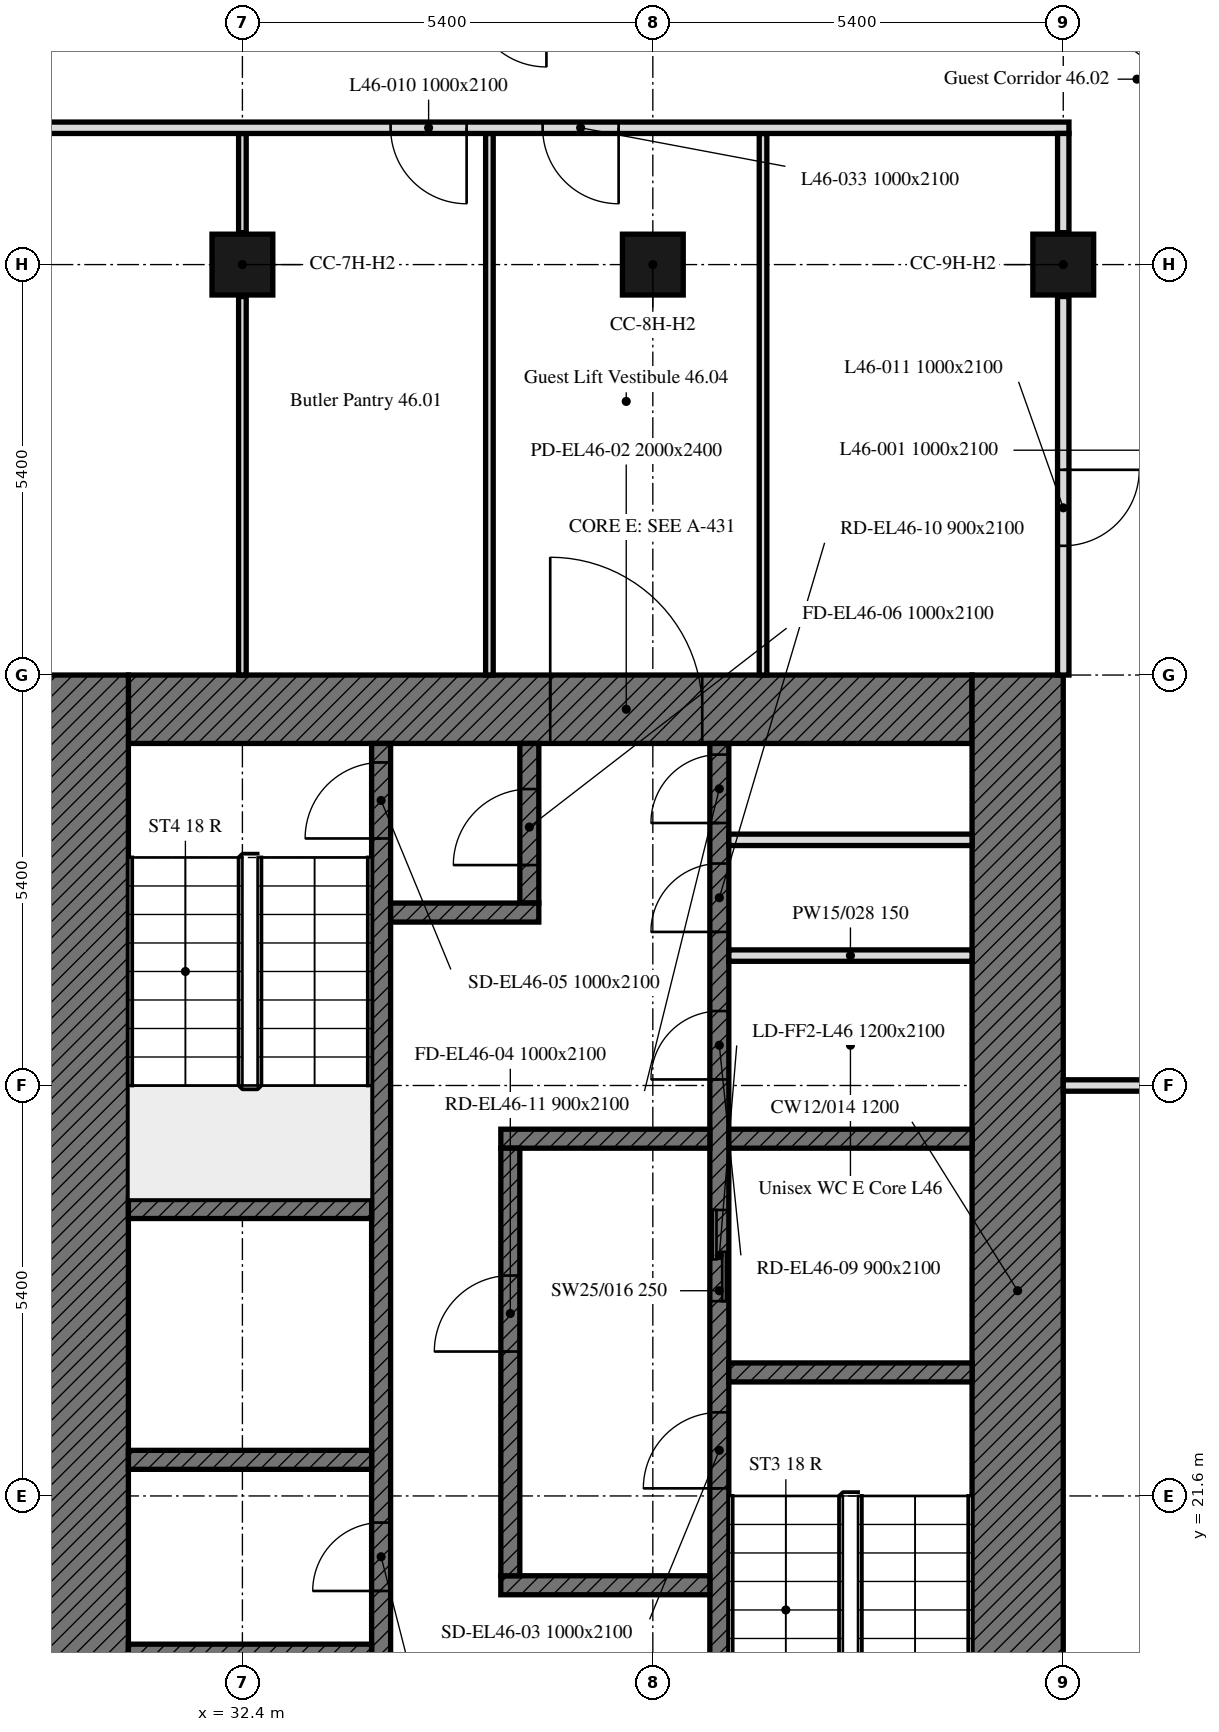
"""IFC4 building model, lengths in metres.
Left out: names, types, materials, properties, quantities, classifications, styles, units other than length and angle.
Written with IfcOpenShell. Run it as: python <this file> out.ifc"""

import sys

from ifc_helpers import new_model, si_unit, direction, frame, frame_2d, origin, origin_2d, place, context, subcontext, project, spatial, rectangle, extrude, element, fill, save


model = new_model("IFC4")
c1 = context("Model", 3, precision=1e-05, world=origin(), true_north=direction((0.0, 1.0)))
c2 = subcontext(c1, "Body", "Model", "MODEL_VIEW")
j1 = project(units=[si_unit("LENGTHUNIT", "METRE"), si_unit("PLANEANGLEUNIT", "RADIAN")], contexts=[c1])
p1 = place(None, origin())
s1 = spatial("IfcSite", under=j1, at=p1, CompositionType="ELEMENT")
p2 = place(p1, origin())
s2 = spatial("IfcBuilding", under=s1, at=p2, CompositionType="ELEMENT")
p3 = place(p2, frame((0.0, 0.0, 190.6)))
s3 = spatial("IfcBuildingStorey", under=s2, at=p3, CompositionType="ELEMENT", Elevation=190.6)
for number, where, z_axis, x_axis in (
    (1, (32.4, 37.8, 0.0), (0.0, 0.0, 1.0), (1.0, 0.0, 0.0)),
    (2, (37.8, 37.8, 0.0), (0.0, 0.0, 1.0), (1.0, 0.0, 0.0)),
    (3, (43.2, 37.8, 0.0), (0.0, 0.0, 1.0), (1.0, 0.0, 0.0)),
):
    element("IfcColumn", number, at=place(p3, frame(where, z_axis=z_axis, x_axis=x_axis)), inside=s3, PredefinedType="COLUMN", context=c2, shape_type="SweptSolid", body=[
        extrude(rectangle(XDim=0.8, YDim=0.8, at=origin_2d()), origin(), (0.0, 0.0, 1.0), 3.0),
    ])
p4 = place(p3, frame((30.9, 31.95, 0.0), z_axis=(0.0, 0.0, 1.0), x_axis=(1.0, 0.0, 0.0)))
e4 = element("IfcWall", 4, at=p4, inside=s3, PredefinedType="SOLIDWALL", context=c2, shape_type="SweptSolid", body=[
    extrude(rectangle(XDim=11.1, YDim=0.9, at=frame_2d((5.55, 0.0))), origin(), (0.0, 0.0, 1.0), 3.0),
])
p5 = place(p4, frame((5.55, 0.0, 0.0)))
e5 = element("IfcOpeningElement", 5, at=p5, cuts=e4, PredefinedType="OPENING", context=c2, shape_type="SweptSolid", body=[
    extrude(rectangle(XDim=2.0, YDim=2.4, at=frame_2d((1.0, 1.2))), frame((0.0, 0.45, 0.0), z_axis=(0.0, -1.0, 0.0), x_axis=(1.0, 0.0, 0.0)), (0.0, 0.0, 1.0), 0.9),
])
for number, where, z_axis, x_axis in (
    (6, (42.6, 32.4, 0.0), (0.0, 0.0, 1.0), (0.0, -1.0, 0.0)),
    (7, (30.3, 16.2, 0.0), (0.0, 0.0, 1.0), (0.0, 1.0, 0.0)),
):
    element("IfcWall", number, at=place(p3, frame(where, z_axis=z_axis, x_axis=x_axis)), inside=s3, PredefinedType="SOLIDWALL", context=c2, shape_type="SweptSolid", body=[
        extrude(rectangle(XDim=16.2, YDim=1.2, at=frame_2d((8.1, 0.0))), origin(), (0.0, 0.0, 1.0), 3.0),
    ])
p6 = place(p3, frame((38.675, 17.1, 0.0), z_axis=(0.0, 0.0, 1.0), x_axis=(0.0, 1.0, 0.0)))
e8 = element("IfcWall", 8, at=p6, inside=s3, PredefinedType="SOLIDWALL", context=c2, shape_type="SweptSolid", body=[
    extrude(rectangle(XDim=14.4, YDim=0.25, at=frame_2d((7.2, 0.0))), origin(), (0.0, 0.0, 1.0), 3.0),
])
p7 = place(p6, frame((4.6, 0.0, 0.0)))
e9 = element("IfcOpeningElement", 9, at=p7, cuts=e8, PredefinedType="OPENING", context=c2, shape_type="SweptSolid", body=[
    extrude(rectangle(XDim=1.0, YDim=2.1, at=frame_2d((0.5, 1.05))), frame((0.0, 0.125, 0.0), z_axis=(0.0, -1.0, 0.0), x_axis=(1.0, 0.0, 0.0)), (0.0, 0.0, 1.0), 0.25),
])
p8 = place(p6, frame((7.062, 0.0, 0.0)))
e10 = element("IfcOpeningElement", 10, at=p8, cuts=e8, PredefinedType="OPENING", context=c2, shape_type="SweptSolid", body=[
    extrude(rectangle(XDim=1.2, YDim=2.1, at=frame_2d((0.6, 1.05))), frame((0.0, 0.125, 0.0), z_axis=(0.0, -1.0, 0.0), x_axis=(1.0, 0.0, 0.0)), (0.0, 0.0, 1.0), 0.25),
])
p9 = place(p6, frame((9.979, 0.0, 0.0)))
e11 = element("IfcOpeningElement", 11, at=p9, cuts=e8, PredefinedType="OPENING", context=c2, shape_type="SweptSolid", body=[
    extrude(rectangle(XDim=0.9, YDim=2.1, at=frame_2d((0.45, 1.05))), frame((0.0, 0.125, 0.0), z_axis=(0.0, -1.0, 0.0), x_axis=(1.0, 0.0, 0.0)), (0.0, 0.0, 1.0), 0.25),
])
p10 = place(p6, frame((11.92, 0.0, 0.0)))
e12 = element("IfcOpeningElement", 12, at=p10, cuts=e8, PredefinedType="OPENING", context=c2, shape_type="SweptSolid", body=[
    extrude(rectangle(XDim=0.9, YDim=2.1, at=frame_2d((0.45, 1.05))), frame((0.0, 0.125, 0.0), z_axis=(0.0, -1.0, 0.0), x_axis=(1.0, 0.0, 0.0)), (0.0, 0.0, 1.0), 0.25),
])
p11 = place(p6, frame((13.354, 0.0, 0.0)))
e13 = element("IfcOpeningElement", 13, at=p11, cuts=e8, PredefinedType="OPENING", context=c2, shape_type="SweptSolid", body=[
    extrude(rectangle(XDim=0.9, YDim=2.1, at=frame_2d((0.45, 1.05))), frame((0.0, 0.125, 0.0), z_axis=(0.0, -1.0, 0.0), x_axis=(1.0, 0.0, 0.0)), (0.0, 0.0, 1.0), 0.25),
])
p12 = place(p3, frame((34.225, 17.1, 0.0), z_axis=(0.0, 0.0, 1.0), x_axis=(0.0, 1.0, 0.0)))
e14 = element("IfcWall", 14, at=p12, inside=s3, PredefinedType="SOLIDWALL", context=c2, shape_type="SweptSolid", body=[
    extrude(rectangle(XDim=14.4, YDim=0.25, at=frame_2d((7.2, 0.0))), origin(), (0.0, 0.0, 1.0), 3.0),
])
p13 = place(p12, frame((13.15, 0.0, 0.0)))
e15 = element("IfcOpeningElement", 15, at=p13, cuts=e14, PredefinedType="OPENING", context=c2, shape_type="SweptSolid", body=[
    extrude(rectangle(XDim=1.0, YDim=2.1, at=frame_2d((0.5, 1.05))), frame((0.0, 0.125, 0.0), z_axis=(0.0, -1.0, 0.0), x_axis=(1.0, 0.0, 0.0)), (0.0, 0.0, 1.0), 0.25),
])
p14 = place(p12, frame((0.6, 0.0, 0.0)))
e16 = element("IfcOpeningElement", 16, at=p14, cuts=e14, PredefinedType="OPENING", context=c2, shape_type="SweptSolid", body=[
    extrude(rectangle(XDim=1.1, YDim=2.1, at=frame_2d((0.55, 1.05))), frame((0.0, 0.125, 0.0), z_axis=(0.0, -1.0, 0.0), x_axis=(1.0, 0.0, 0.0)), (0.0, 0.0, 1.0), 0.25),
])
p15 = place(p12, frame((3.25, 0.0, 0.0)))
e17 = element("IfcOpeningElement", 17, at=p15, cuts=e14, PredefinedType="OPENING", context=c2, shape_type="SweptSolid", body=[
    extrude(rectangle(XDim=0.9, YDim=2.1, at=frame_2d((0.45, 1.05))), frame((0.0, 0.125, 0.0), z_axis=(0.0, -1.0, 0.0), x_axis=(1.0, 0.0, 0.0)), (0.0, 0.0, 1.0), 0.25),
])
p16 = place(p3, frame((38.8, 23.225, 0.0), z_axis=(0.0, 0.0, 1.0), x_axis=(1.0, 0.0, 0.0)))
e18 = element("IfcWall", 18, at=p16, inside=s3, PredefinedType="SOLIDWALL", context=c2, shape_type="SweptSolid", body=[
    extrude(rectangle(XDim=3.2, YDim=0.25, at=frame_2d((1.6, 0.0))), origin(), (0.0, 0.0, 1.0), 3.0),
])
for number, where, z_axis, x_axis in (
    (19, (30.9, 25.375, 0.0), (0.0, 0.0, 1.0), (1.0, 0.0, 0.0)),
    (20, (30.9, 22.075, 0.0), (0.0, 0.0, 1.0), (1.0, 0.0, 0.0)),
):
    element("IfcWall", number, at=place(p3, frame(where, z_axis=z_axis, x_axis=x_axis)), inside=s3, PredefinedType="SOLIDWALL", context=c2, shape_type="SweptSolid", body=[
        extrude(rectangle(XDim=3.2, YDim=0.25, at=frame_2d((1.6, 0.0))), origin(), (0.0, 0.0, 1.0), 3.0),
    ])
p17 = place(p3, frame((38.8, 26.3, 0.0), z_axis=(0.0, 0.0, 1.0), x_axis=(1.0, 0.0, 0.0)))
e21 = element("IfcWall", 21, at=p17, inside=s3, PredefinedType="SOLIDWALL", context=c2, shape_type="SweptSolid", body=[
    extrude(rectangle(XDim=3.2, YDim=0.25, at=frame_2d((1.6, 0.0))), origin(), (0.0, 0.0, 1.0), 3.0),
])
for number, where, z_axis, x_axis in (
    (22, (35.8, 26.3, 0.0), (0.0, 0.0, 1.0), (1.0, 0.0, 0.0)),
    (23, (35.8, 20.425, 0.0), (0.0, 0.0, 1.0), (1.0, 0.0, 0.0)),
):
    element("IfcWall", number, at=place(p3, frame(where, z_axis=z_axis, x_axis=x_axis)), inside=s3, PredefinedType="SOLIDWALL", context=c2, shape_type="SweptSolid", body=[
        extrude(rectangle(XDim=2.75, YDim=0.25, at=frame_2d((1.375, 0.0))), origin(), (0.0, 0.0, 1.0), 3.0),
    ])
p18 = place(p3, frame((36.175, 29.4, 0.0), z_axis=(0.0, 0.0, 1.0), x_axis=(0.0, 1.0, 0.0)))
e24 = element("IfcWall", 24, at=p18, inside=s3, PredefinedType="SOLIDWALL", context=c2, shape_type="SweptSolid", body=[
    extrude(rectangle(XDim=2.1, YDim=0.25, at=frame_2d((1.05, 0.0))), origin(), (0.0, 0.0, 1.0), 3.0),
])
p19 = place(p18, frame((0.5, 0.0, 0.0)))
e25 = element("IfcOpeningElement", 25, at=p19, cuts=e24, PredefinedType="OPENING", context=c2, shape_type="SweptSolid", body=[
    extrude(rectangle(XDim=1.0, YDim=2.1, at=frame_2d((0.5, 1.05))), frame((0.0, 0.125, 0.0), z_axis=(0.0, -1.0, 0.0), x_axis=(1.0, 0.0, 0.0)), (0.0, 0.0, 1.0), 0.25),
])
p20 = place(p3, frame((34.35, 29.275, 0.0), z_axis=(0.0, 0.0, 1.0), x_axis=(1.0, 0.0, 0.0)))
e26 = element("IfcWall", 26, at=p20, inside=s3, PredefinedType="SOLIDWALL", context=c2, shape_type="SweptSolid", body=[
    extrude(rectangle(XDim=1.95, YDim=0.25, at=frame_2d((0.975, 0.0))), origin(), (0.0, 0.0, 1.0), 3.0),
])
p21 = place(p3, frame((35.925, 20.55, 0.0), z_axis=(0.0, 0.0, 1.0), x_axis=(0.0, 1.0, 0.0)))
e27 = element("IfcWall", 27, at=p21, inside=s3, PredefinedType="SOLIDWALL", context=c2, shape_type="SweptSolid", body=[
    extrude(rectangle(XDim=5.625, YDim=0.25, at=frame_2d((2.812, 0.0))), origin(), (0.0, 0.0, 1.0), 3.0),
])
p22 = place(p21, frame((2.95, 0.0, 0.0)))
e28 = element("IfcOpeningElement", 28, at=p22, cuts=e27, PredefinedType="OPENING", context=c2, shape_type="SweptSolid", body=[
    extrude(rectangle(XDim=1.0, YDim=2.1, at=frame_2d((0.5, 1.05))), frame((0.0, 0.125, 0.0), z_axis=(0.0, -1.0, 0.0), x_axis=(1.0, 0.0, 0.0)), (0.0, 0.0, 1.0), 0.25),
])
p23 = place(p3, frame((30.9, 19.525, 0.0), z_axis=(0.0, 0.0, 1.0), x_axis=(1.0, 0.0, 0.0)))
e29 = element("IfcWall", 29, at=p23, inside=s3, PredefinedType="SOLIDWALL", context=c2, shape_type="SweptSolid", body=[
    extrude(rectangle(XDim=3.2, YDim=0.25, at=frame_2d((1.6, 0.0))), origin(), (0.0, 0.0, 1.0), 3.0),
])
for number, where, z_axis, x_axis in (
    (30, (38.8, 28.709, 0.0), (0.0, 0.0, 1.0), (1.0, 0.0, 0.0)),
    (31, (38.8, 30.232, 0.0), (0.0, 0.0, 1.0), (1.0, 0.0, 0.0)),
):
    element("IfcWall", number, at=place(p3, frame(where, z_axis=z_axis, x_axis=x_axis)), inside=s3, PredefinedType="PARTITIONING", context=c2, shape_type="SweptSolid", body=[
        extrude(rectangle(XDim=3.2, YDim=0.15, at=frame_2d((1.6, 0.0))), origin(), (0.0, 0.0, 1.0), 3.0),
    ])
p24 = place(p3, frame((32.4, 32.4, 0.0), z_axis=(0.0, 0.0, 1.0), x_axis=(0.0, 1.0, 0.0)))
e32 = element("IfcWall", 32, at=p24, inside=s3, PredefinedType="PARTITIONING", context=c2, shape_type="SweptSolid", body=[
    extrude(rectangle(XDim=4.98, YDim=0.1, at=frame_2d((2.49, 0.0))), origin(), (0.0, 0.0, 1.0), 2.4),
])
p25 = place(p3, frame((32.4, 38.22, 0.0), z_axis=(0.0, 0.0, 1.0), x_axis=(0.0, 1.0, 0.0)))
e33 = element("IfcWall", 33, at=p25, inside=s3, PredefinedType="PARTITIONING", context=c2, shape_type="SweptSolid", body=[
    extrude(rectangle(XDim=1.305, YDim=0.1, at=frame_2d((0.652, 0.0))), origin(), (0.0, 0.0, 1.0), 2.4),
])
for number, where, z_axis, x_axis in (
    (34, (35.65, 39.525, 0.0), (0.0, 0.0, 1.0), (0.0, -1.0, 0.0)),
    (35, (39.25, 32.4, 0.0), (0.0, 0.0, 1.0), (0.0, 1.0, 0.0)),
):
    element("IfcWall", number, at=place(p3, frame(where, z_axis=z_axis, x_axis=x_axis)), inside=s3, PredefinedType="PARTITIONING", context=c2, shape_type="SweptSolid", body=[
        extrude(rectangle(XDim=7.125, YDim=0.1, at=frame_2d((3.562, 0.0))), origin(), (0.0, 0.0, 1.0), 2.4),
    ])
p26 = place(p3, frame((43.2, 27.0, 0.0), z_axis=(0.0, 0.0, 1.0), x_axis=(1.0, 0.0, 0.0)))
e36 = element("IfcWall", 36, at=p26, inside=s3, PredefinedType="PARTITIONING", context=c2, shape_type="SweptSolid", body=[
    extrude(rectangle(XDim=2.025, YDim=0.15, at=frame_2d((1.013, 0.0))), origin(), (0.0, 0.0, 1.0), 2.4),
])
p27 = place(p3, frame((43.275, 39.6, 0.0), z_axis=(0.0, 0.0, 1.0), x_axis=(-1.0, 0.0, 0.0)))
e37 = element("IfcWall", 37, at=p27, inside=s3, PredefinedType="PARTITIONING", context=c2, shape_type="SweptSolid", body=[
    extrude(rectangle(XDim=36.049, YDim=0.15, at=frame_2d((18.024, 0.0))), origin(), (0.0, 0.0, 1.0), 2.4),
])
p28 = place(p27, frame((18.475, 0.0, 0.0)))
e38 = element("IfcOpeningElement", 38, at=p28, cuts=e37, PredefinedType="OPENING", context=c2, shape_type="SweptSolid", body=[
    extrude(rectangle(XDim=1.0, YDim=2.1, at=frame_2d((0.5, 1.05))), frame((0.0, 0.075, 0.0), z_axis=(0.0, -1.0, 0.0), x_axis=(1.0, 0.0, 0.0)), (0.0, 0.0, 1.0), 0.15),
])
p29 = place(p27, frame((34.799, 0.0, 0.0)))
e39 = element("IfcOpeningElement", 39, at=p29, cuts=e37, PredefinedType="OPENING", context=c2, shape_type="SweptSolid", body=[
    extrude(rectangle(XDim=1.0, YDim=2.1, at=frame_2d((0.5, 1.05))), frame((0.0, 0.075, 0.0), z_axis=(0.0, -1.0, 0.0), x_axis=(1.0, 0.0, 0.0)), (0.0, 0.0, 1.0), 0.15),
])
p30 = place(p27, frame((7.925, 0.0, 0.0)))
e40 = element("IfcOpeningElement", 40, at=p30, cuts=e37, PredefinedType="OPENING", context=c2, shape_type="SweptSolid", body=[
    extrude(rectangle(XDim=1.0, YDim=2.1, at=frame_2d((0.5, 1.05))), frame((0.0, 0.075, 0.0), z_axis=(0.0, -1.0, 0.0), x_axis=(1.0, 0.0, 0.0)), (0.0, 0.0, 1.0), 0.15),
])
p31 = place(p27, frame((29.025, 0.0, 0.0)))
e41 = element("IfcOpeningElement", 41, at=p31, cuts=e37, PredefinedType="OPENING", context=c2, shape_type="SweptSolid", body=[
    extrude(rectangle(XDim=1.0, YDim=2.1, at=frame_2d((0.5, 1.05))), frame((0.0, 0.075, 0.0), z_axis=(0.0, -1.0, 0.0), x_axis=(1.0, 0.0, 0.0)), (0.0, 0.0, 1.0), 0.15),
])
p32 = place(p27, frame((30.495, 0.0, 0.0)))
e42 = element("IfcOpeningElement", 42, at=p32, cuts=e37, PredefinedType="OPENING", context=c2, shape_type="SweptSolid", body=[
    extrude(rectangle(XDim=1.8, YDim=2.4, at=frame_2d((0.9, 1.2))), frame((0.0, 0.075, 0.0), z_axis=(0.0, -1.0, 0.0), x_axis=(1.0, 0.0, 0.0)), (0.0, 0.0, 1.0), 0.15),
])
p33 = place(p27, frame((5.925, 0.0, 0.0)))
e43 = element("IfcOpeningElement", 43, at=p33, cuts=e37, PredefinedType="OPENING", context=c2, shape_type="SweptSolid", body=[
    extrude(rectangle(XDim=1.0, YDim=2.1, at=frame_2d((0.5, 1.05))), frame((0.0, 0.075, 0.0), z_axis=(0.0, -1.0, 0.0), x_axis=(1.0, 0.0, 0.0)), (0.0, 0.0, 1.0), 0.15),
])
p34 = place(p3, frame((43.2, 39.525, 0.0), z_axis=(0.0, 0.0, 1.0), x_axis=(0.0, -1.0, 0.0)))
e44 = element("IfcWall", 44, at=p34, inside=s3, PredefinedType="PARTITIONING", context=c2, shape_type="SweptSolid", body=[
    extrude(rectangle(XDim=1.305, YDim=0.15, at=frame_2d((0.652, 0.0))), origin(), (0.0, 0.0, 1.0), 3.0),
])
p35 = place(p3, frame((43.2, 37.38, 0.0), z_axis=(0.0, 0.0, 1.0), x_axis=(0.0, -1.0, 0.0)))
e45 = element("IfcWall", 45, at=p35, inside=s3, PredefinedType="PARTITIONING", context=c2, shape_type="SweptSolid", body=[
    extrude(rectangle(XDim=4.98, YDim=0.15, at=frame_2d((2.49, 0.0))), origin(), (0.0, 0.0, 1.0), 3.0),
])
p36 = place(p35, frame((2.28, 0.0, 0.0)))
e46 = element("IfcOpeningElement", 46, at=p36, cuts=e45, PredefinedType="OPENING", context=c2, shape_type="SweptSolid", body=[
    extrude(rectangle(XDim=1.0, YDim=2.1, at=frame_2d((0.5, 1.05))), frame((0.0, 0.075, 0.0), z_axis=(0.0, -1.0, 0.0), x_axis=(1.0, 0.0, 0.0)), (0.0, 0.0, 1.0), 0.15),
])
p37 = place(p5, origin())
e47 = element("IfcDoor", 47, at=p37, inside=s3, OperationType="DOUBLE_DOOR_SINGLE_SWING", PredefinedType="DOOR", context=c2, shape_type="SweptSolid", body=[
    extrude(rectangle(XDim=2.0, YDim=2.4, at=frame_2d((1.0, 1.2))), frame((0.0, 0.025, 0.0), z_axis=(0.0, -1.0, 0.0), x_axis=(1.0, 0.0, 0.0)), (0.0, 0.0, 1.0), 0.05),
])
fill(e5, e47)
p38 = place(p7, origin())
e48 = element("IfcDoor", 48, at=p38, inside=s3, OperationType="SINGLE_SWING_LEFT", PredefinedType="DOOR", context=c2, shape_type="SweptSolid", body=[
    extrude(rectangle(XDim=1.0, YDim=2.1, at=frame_2d((0.5, 1.05))), frame((0.0, 0.025, 0.0), z_axis=(0.0, -1.0, 0.0), x_axis=(1.0, 0.0, 0.0)), (0.0, 0.0, 1.0), 0.05),
])
fill(e9, e48)
p39 = place(p22, origin())
e49 = element("IfcDoor", 49, at=p39, inside=s3, OperationType="SINGLE_SWING_LEFT", PredefinedType="DOOR", context=c2, shape_type="SweptSolid", body=[
    extrude(rectangle(XDim=1.0, YDim=2.1, at=frame_2d((0.5, 1.05))), frame((0.0, 0.025, 0.0), z_axis=(0.0, -1.0, 0.0), x_axis=(1.0, 0.0, 0.0)), (0.0, 0.0, 1.0), 0.05),
])
fill(e28, e49)
p40 = place(p13, origin())
e50 = element("IfcDoor", 50, at=p40, inside=s3, OperationType="SINGLE_SWING_LEFT", PredefinedType="DOOR", context=c2, shape_type="SweptSolid", body=[
    extrude(rectangle(XDim=1.0, YDim=2.1, at=frame_2d((0.5, 1.05))), frame((0.0, 0.025, 0.0), z_axis=(0.0, -1.0, 0.0), x_axis=(1.0, 0.0, 0.0)), (0.0, 0.0, 1.0), 0.05),
])
fill(e15, e50)
p41 = place(p19, origin())
e51 = element("IfcDoor", 51, at=p41, inside=s3, OperationType="SINGLE_SWING_LEFT", PredefinedType="DOOR", context=c2, shape_type="SweptSolid", body=[
    extrude(rectangle(XDim=1.0, YDim=2.1, at=frame_2d((0.5, 1.05))), frame((0.0, 0.025, 0.0), z_axis=(0.0, -1.0, 0.0), x_axis=(1.0, 0.0, 0.0)), (0.0, 0.0, 1.0), 0.05),
])
fill(e25, e51)
p42 = place(p8, origin())
e52 = element("IfcDoor", 52, at=p42, inside=s3, OperationType="DOUBLE_DOOR_SLIDING", PredefinedType="DOOR", context=c2, shape_type="SweptSolid", body=[
    extrude(rectangle(XDim=1.2, YDim=2.1, at=frame_2d((0.6, 1.05))), frame((0.0, 0.025, 0.0), z_axis=(0.0, -1.0, 0.0), x_axis=(1.0, 0.0, 0.0)), (0.0, 0.0, 1.0), 0.05),
])
fill(e10, e52)
p43 = place(p9, origin())
e53 = element("IfcDoor", 53, at=p43, inside=s3, OperationType="SINGLE_SWING_LEFT", PredefinedType="DOOR", context=c2, shape_type="SweptSolid", body=[
    extrude(rectangle(XDim=0.9, YDim=2.1, at=frame_2d((0.45, 1.05))), frame((0.0, 0.025, 0.0), z_axis=(0.0, -1.0, 0.0), x_axis=(1.0, 0.0, 0.0)), (0.0, 0.0, 1.0), 0.05),
])
fill(e11, e53)
p44 = place(p10, origin())
e54 = element("IfcDoor", 54, at=p44, inside=s3, OperationType="SINGLE_SWING_LEFT", PredefinedType="DOOR", context=c2, shape_type="SweptSolid", body=[
    extrude(rectangle(XDim=0.9, YDim=2.1, at=frame_2d((0.45, 1.05))), frame((0.0, 0.025, 0.0), z_axis=(0.0, -1.0, 0.0), x_axis=(1.0, 0.0, 0.0)), (0.0, 0.0, 1.0), 0.05),
])
fill(e12, e54)
p45 = place(p11, origin())
e55 = element("IfcDoor", 55, at=p45, inside=s3, OperationType="SINGLE_SWING_LEFT", PredefinedType="DOOR", context=c2, shape_type="SweptSolid", body=[
    extrude(rectangle(XDim=0.9, YDim=2.1, at=frame_2d((0.45, 1.05))), frame((0.0, 0.025, 0.0), z_axis=(0.0, -1.0, 0.0), x_axis=(1.0, 0.0, 0.0)), (0.0, 0.0, 1.0), 0.05),
])
fill(e13, e55)
p46 = place(p15, origin())
e56 = element("IfcDoor", 56, at=p46, inside=s3, OperationType="SINGLE_SWING_LEFT", PredefinedType="DOOR", context=c2, shape_type="SweptSolid", body=[
    extrude(rectangle(XDim=0.9, YDim=2.1, at=frame_2d((0.45, 1.05))), frame((0.0, 0.025, 0.0), z_axis=(0.0, -1.0, 0.0), x_axis=(1.0, 0.0, 0.0)), (0.0, 0.0, 1.0), 0.05),
])
fill(e17, e56)
p47 = place(p30, origin())
e57 = element("IfcDoor", 57, at=p47, inside=s3, OperationType="SINGLE_SWING_RIGHT", PredefinedType="DOOR", context=c2, shape_type="SweptSolid", body=[
    extrude(rectangle(XDim=1.0, YDim=2.1, at=frame_2d((0.5, 1.05))), frame((0.0, 0.025, 0.0), z_axis=(0.0, -1.0, 0.0), x_axis=(1.0, 0.0, 0.0)), (0.0, 0.0, 1.0), 0.05),
])
fill(e40, e57)
p48 = place(p36, origin())
e58 = element("IfcDoor", 58, at=p48, inside=s3, OperationType="SINGLE_SWING_LEFT", PredefinedType="DOOR", context=c2, shape_type="SweptSolid", body=[
    extrude(rectangle(XDim=1.0, YDim=2.1, at=frame_2d((0.5, 1.05))), frame((0.0, 0.025, 0.0), z_axis=(0.0, -1.0, 0.0), x_axis=(1.0, 0.0, 0.0)), (0.0, 0.0, 1.0), 0.05),
])
fill(e46, e58)
p49 = place(p33, origin())
e59 = element("IfcDoor", 59, at=p49, inside=s3, OperationType="SINGLE_SWING_LEFT", PredefinedType="DOOR", context=c2, shape_type="SweptSolid", body=[
    extrude(rectangle(XDim=1.0, YDim=2.1, at=frame_2d((0.5, 1.05))), frame((0.0, 0.025, 0.0), z_axis=(0.0, -1.0, 0.0), x_axis=(1.0, 0.0, 0.0)), (0.0, 0.0, 1.0), 0.05),
])
fill(e43, e59)
save(model, sys.argv[1])
